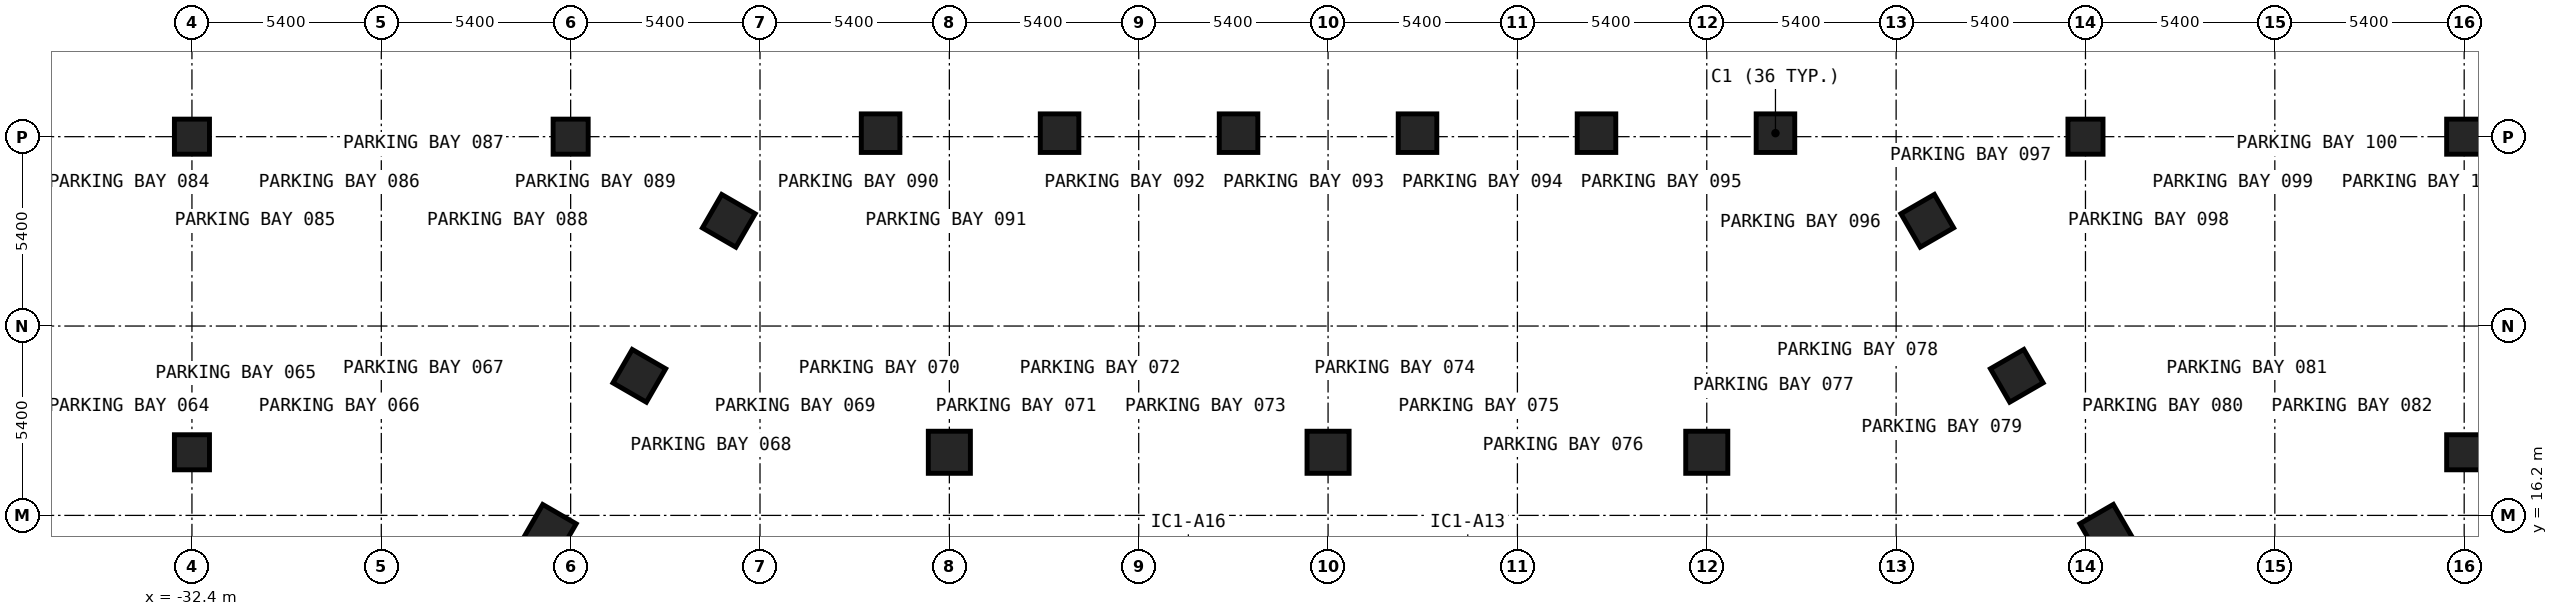
"""IFC4 building model, lengths in metres.
Left out: names, types, materials, properties, quantities, classifications, styles, units other than length and angle.
Written with IfcOpenShell. Run it as: python <this file> out.ifc"""

import sys

from ifc_helpers import new_model, si_unit, direction, frame, origin, origin_2d, place, context, subcontext, project, spatial, rectangle, extrude, element, save


model = new_model("IFC4")
c1 = context("Model", 3, precision=1e-05, world=origin(), true_north=direction((0.0, 1.0)))
c2 = subcontext(c1, "Body", "Model", "MODEL_VIEW")
j1 = project(units=[si_unit("LENGTHUNIT", "METRE"), si_unit("PLANEANGLEUNIT", "RADIAN")], contexts=[c1])
p1 = place(None, origin())
s1 = spatial("IfcSite", under=j1, at=p1, CompositionType="ELEMENT")
p2 = place(p1, origin())
s2 = spatial("IfcBuilding", under=s1, at=p2, CompositionType="ELEMENT")
p3 = place(p2, frame((0.0, 0.0, -4.2)))
s3 = spatial("IfcBuildingStorey", under=s2, at=p3, CompositionType="ELEMENT", Elevation=-4.2)
for number, where, z_axis, x_axis in (
    (1, (12.759, 27.1, 0.0), (0.0, 0.0, 1.0), (-1.0, 0.0, 0.0)),
    (2, (7.655, 27.1, 0.0), (0.0, 0.0, 1.0), (-1.0, 0.0, 0.0)),
    (3, (2.551, 27.1, 0.0), (0.0, 0.0, 1.0), (-1.0, 0.0, 0.0)),
    (4, (-2.553, 27.1, 0.0), (0.0, 0.0, 1.0), (-1.0, 0.0, 0.0)),
    (5, (-7.657, 27.1, 0.0), (0.0, 0.0, 1.0), (-1.0, 0.0, 0.0)),
    (6, (-12.761, 27.1, 0.0), (0.0, 0.0, 1.0), (-1.0, 0.0, 0.0)),
    (7, (-17.09, 24.6, 0.0), (0.0, 0.0, 1.0), (-0.5, -0.866, 0.0)),
    (8, (-19.642, 20.18, 0.0), (0.0, 0.0, 1.0), (-0.5, -0.866, 0.0)),
    (9, (-22.194, 15.759, 0.0), (0.0, 0.0, 1.0), (-0.5, -0.866, 0.0)),
    (10, (22.193, 15.761, 0.0), (0.0, 0.0, 1.0), (-0.5, 0.866, 0.0)),
    (11, (19.641, 20.181, 0.0), (0.0, 0.0, 1.0), (-0.5, 0.866, 0.0)),
    (12, (17.089, 24.601, 0.0), (0.0, 0.0, 1.0), (-0.5, 0.866, 0.0)),
):
    element("IfcColumn", number, at=place(p3, frame(where, z_axis=z_axis, x_axis=x_axis)), inside=s3, PredefinedType="COLUMN", context=c2, shape_type="SweptSolid", body=[
        extrude(rectangle(XDim=1.1, YDim=1.1, at=origin_2d()), origin(), (0.0, 0.0, 1.0), 4.2),
    ])
for number, where, z_axis, x_axis in (
    (13, (-10.8, 18.0, 0.0), (0.0, 0.0, 1.0), (1.0, 0.0, 0.0)),
    (14, (0.0, 18.0, 0.0), (0.0, 0.0, 1.0), (1.0, 0.0, 0.0)),
    (15, (10.8, 18.0, 0.0), (0.0, 0.0, 1.0), (1.0, 0.0, 0.0)),
):
    element("IfcColumn", number, at=place(p3, frame(where, z_axis=z_axis, x_axis=x_axis)), inside=s3, PredefinedType="COLUMN", context=c2, shape_type="SweptSolid", body=[
        extrude(rectangle(XDim=1.2, YDim=1.2, at=origin_2d()), origin(), (0.0, 0.0, 1.0), 4.2),
    ])
for number, where, z_axis, x_axis in (
    (16, (-32.4, 18.0, 0.0), (0.0, 0.0, 1.0), (1.0, 0.0, 0.0)),
    (17, (-32.4, 27.0, 0.0), (0.0, 0.0, 1.0), (1.0, 0.0, 0.0)),
    (18, (-21.6, 27.0, 0.0), (0.0, 0.0, 1.0), (1.0, 0.0, 0.0)),
    (19, (21.6, 27.0, 0.0), (0.0, 0.0, 1.0), (1.0, 0.0, 0.0)),
    (20, (32.4, 18.0, 0.0), (0.0, 0.0, 1.0), (1.0, 0.0, 0.0)),
    (21, (32.4, 27.0, 0.0), (0.0, 0.0, 1.0), (1.0, 0.0, 0.0)),
):
    element("IfcColumn", number, at=place(p3, frame(where, z_axis=z_axis, x_axis=x_axis)), inside=s3, PredefinedType="COLUMN", context=c2, shape_type="SweptSolid", body=[
        extrude(rectangle(XDim=1.0, YDim=1.0, at=origin_2d()), origin(), (0.0, 0.0, 1.0), 4.2),
    ])
save(model, sys.argv[1])
